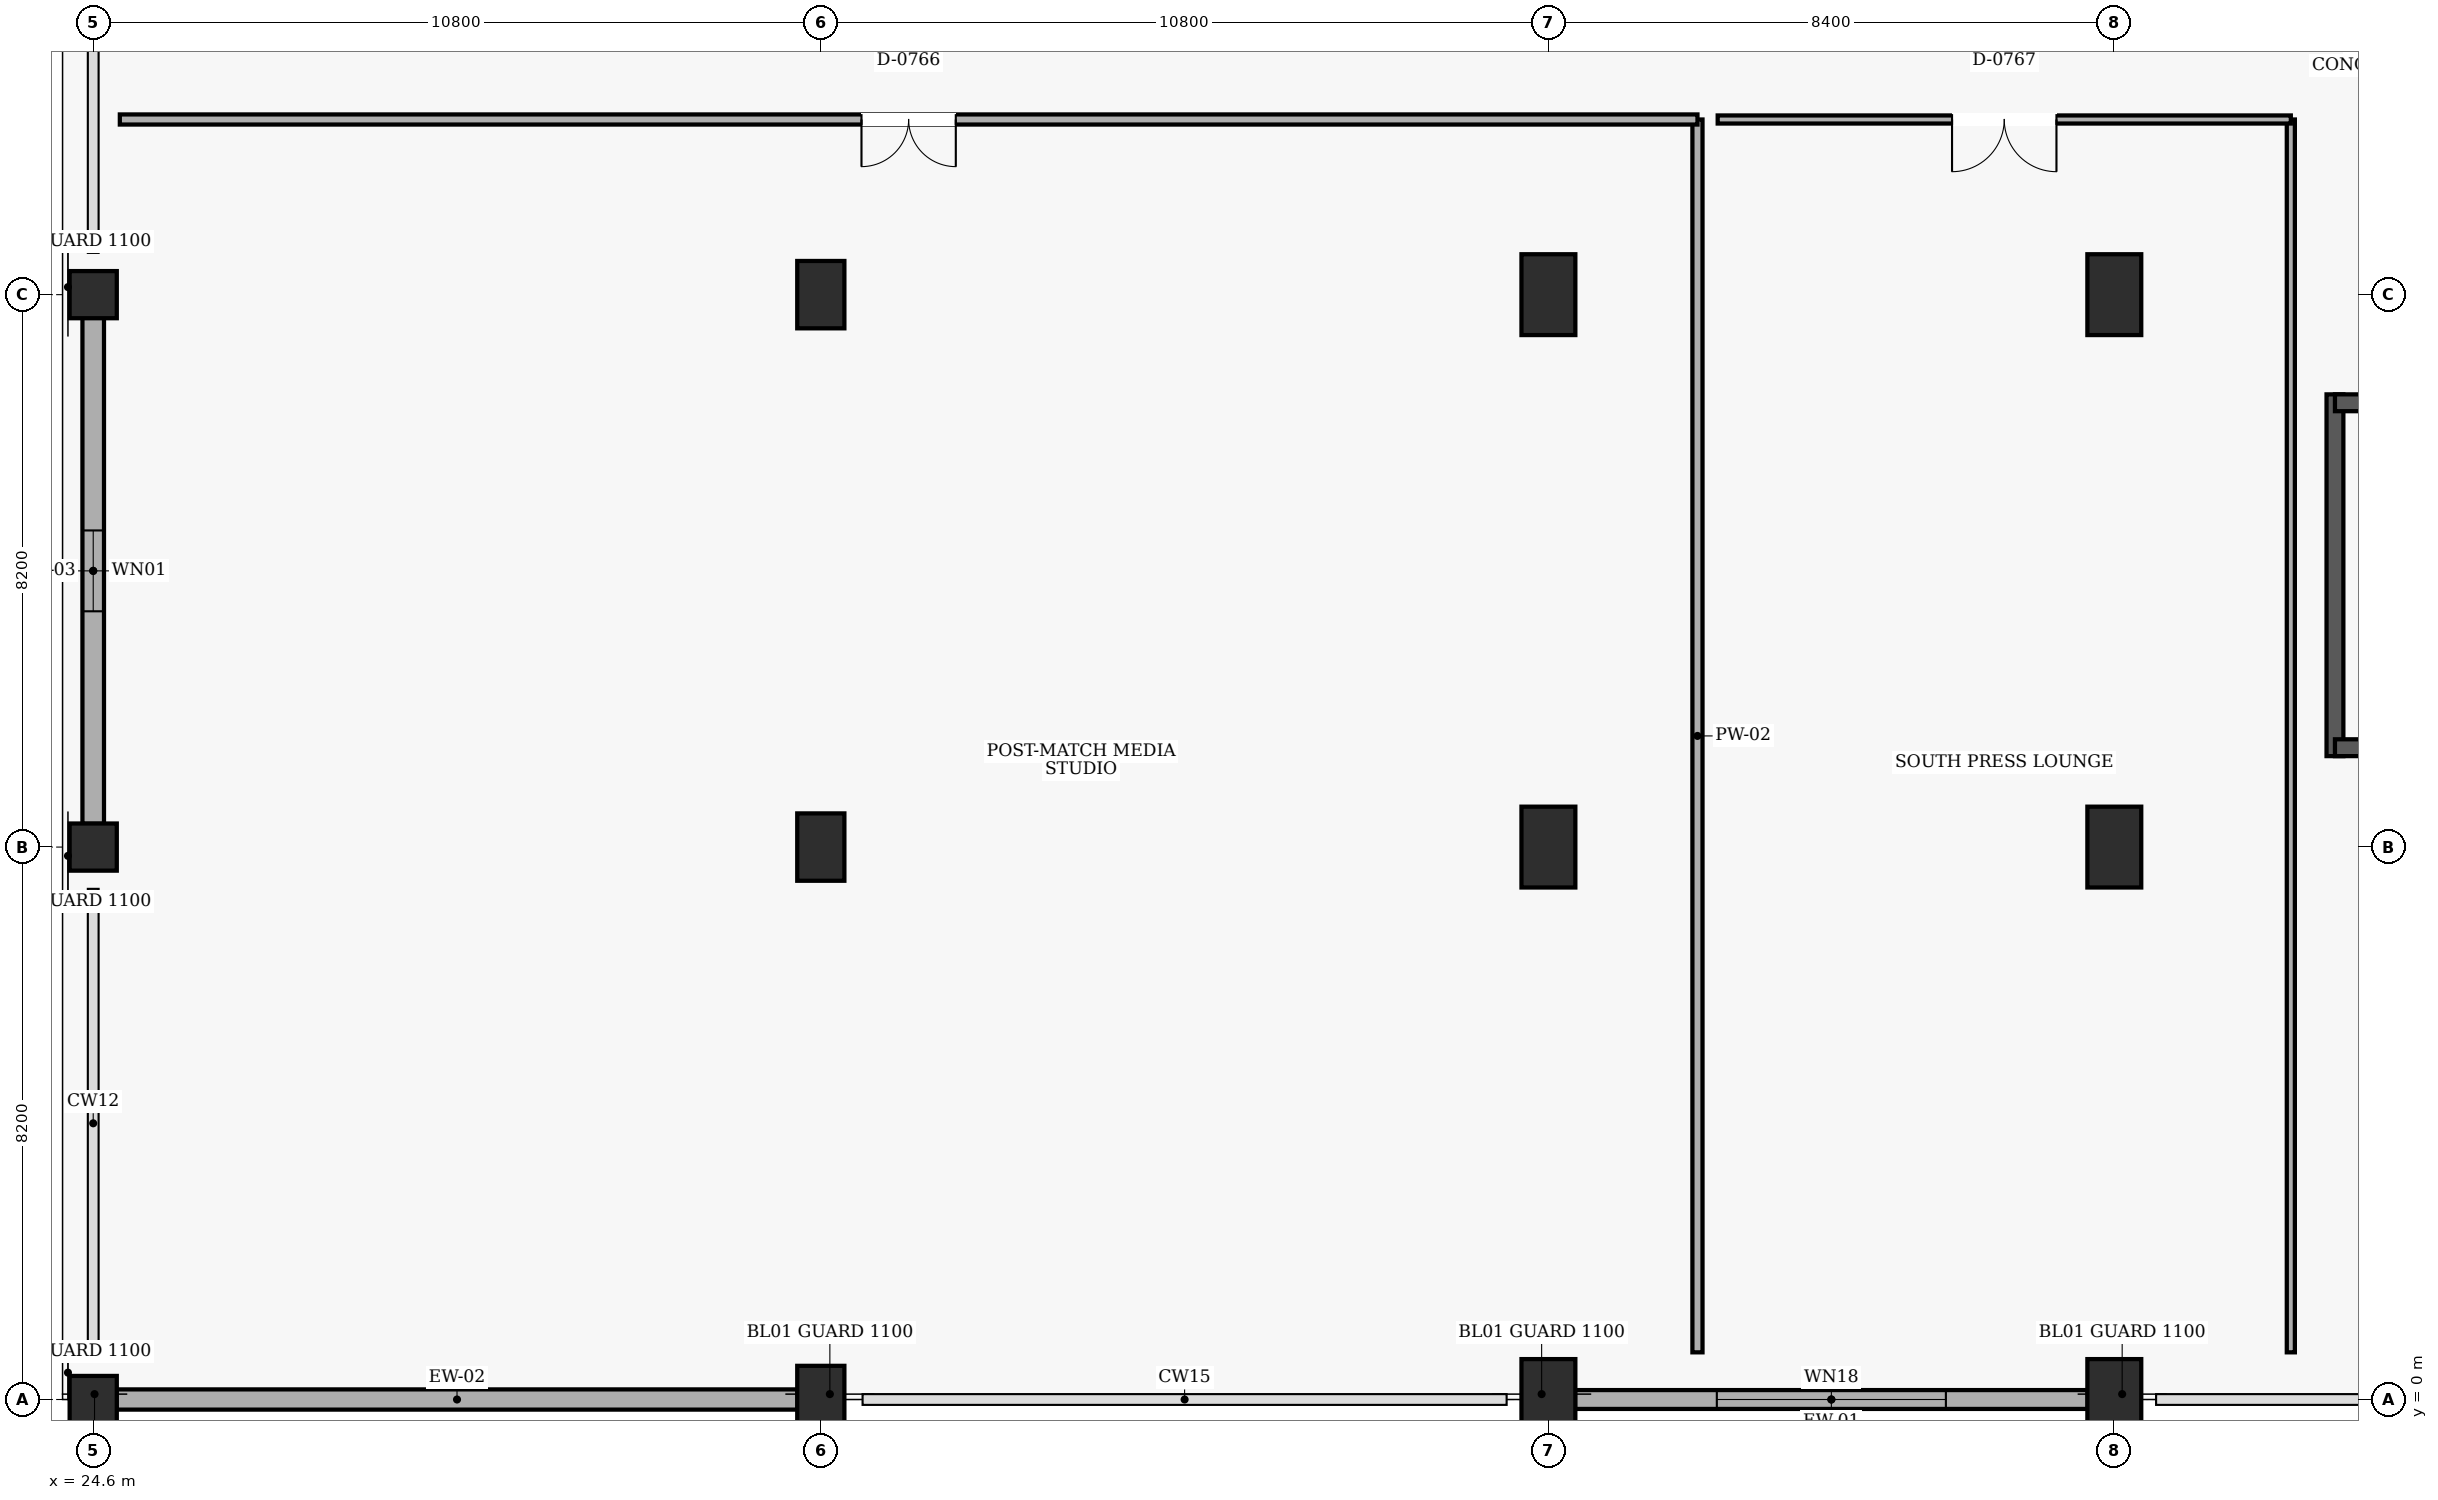
"""IFC4 building model, lengths in metres.
Left out: names, types, materials, properties, quantities, classifications, styles, units other than length and angle.
Written with IfcOpenShell. Run it as: python <this file> out.ifc"""

import sys

from ifc_helpers import new_model, si_unit, direction, frame, frame_2d, origin, origin_2d, place, context, subcontext, project, spatial, rectangle, extrude, element, fill, save


model = new_model("IFC4")
c1 = context("Model", 3, precision=1e-05, world=origin(), true_north=direction((0.0, 1.0)))
c2 = subcontext(c1, "Body", "Model", "MODEL_VIEW")
j1 = project(units=[si_unit("LENGTHUNIT", "METRE"), si_unit("PLANEANGLEUNIT", "RADIAN")], contexts=[c1])
p1 = place(None, origin())
s1 = spatial("IfcSite", under=j1, at=p1, CompositionType="ELEMENT")
p2 = place(p1, origin())
s2 = spatial("IfcBuilding", under=s1, at=p2, CompositionType="ELEMENT")
p3 = place(p2, frame((0.0, 0.0, 19.8)))
s3 = spatial("IfcBuildingStorey", under=s2, at=p3, CompositionType="ELEMENT", Elevation=19.8)
for number, where, z_axis, x_axis in (
    (1, (24.6, 0.0, 0.0), (0.0, 0.0, 1.0), (1.0, 0.0, 0.0)),
    (2, (24.6, 8.2, 0.0), (0.0, 0.0, 1.0), (1.0, 0.0, 0.0)),
    (3, (24.6, 16.4, 0.0), (0.0, 0.0, 1.0), (1.0, 0.0, 0.0)),
):
    element("IfcColumn", number, at=place(p3, frame(where, z_axis=z_axis, x_axis=x_axis)), inside=s3, PredefinedType="COLUMN", context=c2, shape_type="SweptSolid", body=[
        extrude(rectangle(XDim=0.7, YDim=0.7, at=origin_2d()), origin(), (0.0, 0.0, 1.0), 4.8),
    ])
for number, where, z_axis, x_axis in (
    (4, (35.4, 0.0, 0.0), (0.0, 0.0, 1.0), (1.0, 0.0, 0.0)),
    (5, (35.4, 8.2, 0.0), (0.0, 0.0, 1.0), (1.0, 0.0, 0.0)),
    (6, (35.4, 16.4, 0.0), (0.0, 0.0, 1.0), (1.0, 0.0, 0.0)),
):
    element("IfcColumn", number, at=place(p3, frame(where, z_axis=z_axis, x_axis=x_axis)), inside=s3, PredefinedType="COLUMN", context=c2, shape_type="SweptSolid", body=[
        extrude(rectangle(XDim=0.7, YDim=1.0, at=origin_2d()), origin(), (0.0, 0.0, 1.0), 4.8),
    ])
for number, where, z_axis, x_axis in (
    (7, (46.2, 0.0, 0.0), (0.0, 0.0, 1.0), (1.0, 0.0, 0.0)),
    (8, (46.2, 8.2, 0.0), (0.0, 0.0, 1.0), (1.0, 0.0, 0.0)),
    (9, (46.2, 16.4, 0.0), (0.0, 0.0, 1.0), (1.0, 0.0, 0.0)),
    (10, (54.6, 0.0, 0.0), (0.0, 0.0, 1.0), (1.0, 0.0, 0.0)),
    (11, (54.6, 8.2, 0.0), (0.0, 0.0, 1.0), (1.0, 0.0, 0.0)),
    (12, (54.6, 16.4, 0.0), (0.0, 0.0, 1.0), (1.0, 0.0, 0.0)),
):
    element("IfcColumn", number, at=place(p3, frame(where, z_axis=z_axis, x_axis=x_axis)), inside=s3, PredefinedType="COLUMN", context=c2, shape_type="SweptSolid", body=[
        extrude(rectangle(XDim=0.8, YDim=1.2, at=origin_2d()), origin(), (0.0, 0.0, 1.0), 4.8),
    ])
p4 = place(p3, frame((24.6, 8.545, 0.0), z_axis=(0.0, 0.0, 1.0), x_axis=(0.0, 1.0, 0.0)))
e13 = element("IfcWall", 13, at=p4, inside=s3, PredefinedType="SOLIDWALL", context=c2, shape_type="SweptSolid", body=[
    extrude(rectangle(XDim=7.51, YDim=0.32, at=frame_2d((3.755, 0.0))), origin(), (0.0, 0.0, 1.0), 3.82),
])
p5 = place(p4, frame((3.155, 0.0, 0.9)))
e14 = element("IfcOpeningElement", 14, at=p5, cuts=e13, PredefinedType="OPENING", context=c2, shape_type="SweptSolid", body=[
    extrude(rectangle(XDim=1.2, YDim=1.5, at=frame_2d((0.6, 0.75))), frame((0.0, 0.17, 0.0), z_axis=(0.0, -1.0, 0.0), x_axis=(1.0, 0.0, 0.0)), (0.0, 0.0, 1.0), 0.34),
])
p6 = place(p3, frame((54.205, 0.0, 0.0), z_axis=(0.0, 0.0, 1.0), x_axis=(-1.0, 0.0, 0.0)))
e15 = element("IfcWall", 15, at=p6, inside=s3, PredefinedType="SOLIDWALL", context=c2, shape_type="SweptSolid", body=[
    extrude(rectangle(XDim=7.61, YDim=0.28, at=frame_2d((3.805, 0.0))), origin(), (0.0, 0.0, 1.0), 3.68),
])
p7 = place(p6, frame((2.105, 0.0, 0.9)))
e16 = element("IfcOpeningElement", 16, at=p7, cuts=e15, PredefinedType="OPENING", context=c2, shape_type="SweptSolid", body=[
    extrude(rectangle(XDim=3.4, YDim=2.1, at=frame_2d((1.7, 1.05))), frame((0.0, 0.15, 0.0), z_axis=(0.0, -1.0, 0.0), x_axis=(1.0, 0.0, 0.0)), (0.0, 0.0, 1.0), 0.3),
])
p8 = place(p3, frame((35.055, 0.0, 0.0), z_axis=(0.0, 0.0, 1.0), x_axis=(-1.0, 0.0, 0.0)))
e17 = element("IfcWall", 17, at=p8, inside=s3, PredefinedType="SOLIDWALL", context=c2, shape_type="SweptSolid", body=[
    extrude(rectangle(XDim=10.11, YDim=0.3, at=frame_2d((5.055, 0.0))), origin(), (0.0, 0.0, 1.0), 3.52),
])
p9 = place(p3, frame((57.875, 14.92, 0.0), z_axis=(0.0, 0.0, 1.0), x_axis=(0.0, -1.0, 0.0)))
e18 = element("IfcWall", 18, at=p9, inside=s3, PredefinedType="SHEAR", context=c2, shape_type="SweptSolid", body=[
    extrude(rectangle(XDim=5.37, YDim=0.25, at=frame_2d((2.685, 0.0))), origin(), (0.0, 0.0, 1.0), 4.5),
])
p10 = place(p3, frame((57.875, 14.795, 0.0), z_axis=(0.0, 0.0, 1.0), x_axis=(1.0, 0.0, 0.0)))
e19 = element("IfcWall", 19, at=p10, inside=s3, PredefinedType="SHEAR", context=c2, shape_type="SweptSolid", body=[
    extrude(rectangle(XDim=10.85, YDim=0.25, at=frame_2d((5.425, 0.0))), origin(), (0.0, 0.0, 1.0), 4.5),
])
p11 = place(p10, frame((0.52, 0.0, 0.0)))
e20 = element("IfcOpeningElement", 20, at=p11, cuts=e19, PredefinedType="OPENING", context=c2, shape_type="SweptSolid", body=[
    extrude(rectangle(XDim=1.4, YDim=2.15, at=frame_2d((0.7, 1.075))), frame((0.0, 0.135, 0.0), z_axis=(0.0, -1.0, 0.0), x_axis=(1.0, 0.0, 0.0)), (0.0, 0.0, 1.0), 0.27),
])
p12 = place(p3, frame((57.875, 9.675, 0.0), z_axis=(0.0, 0.0, 1.0), x_axis=(1.0, 0.0, 0.0)))
e21 = element("IfcWall", 21, at=p12, inside=s3, PredefinedType="SHEAR", context=c2, shape_type="SweptSolid", body=[
    extrude(rectangle(XDim=10.85, YDim=0.25, at=frame_2d((5.425, 0.0))), origin(), (0.0, 0.0, 1.0), 4.5),
])
p13 = place(p3, frame((48.413, 0.7, 0.0), z_axis=(0.0, 0.0, 1.0), x_axis=(0.0, 1.0, 0.0)))
e22 = element("IfcWall", 22, at=p13, inside=s3, PredefinedType="PARTITIONING", context=c2, shape_type="SweptSolid", body=[
    extrude(rectangle(XDim=18.3, YDim=0.15, at=frame_2d((9.15, 0.0))), origin(), (0.0, 0.0, 1.0), 4.5),
])
p14 = place(p3, frame((48.413, 19.0, 0.0), z_axis=(0.0, 0.0, 1.0), x_axis=(-1.0, 0.0, 0.0)))
e23 = element("IfcWall", 23, at=p14, inside=s3, PredefinedType="PARTITIONING", context=c2, shape_type="SweptSolid", body=[
    extrude(rectangle(XDim=23.417, YDim=0.15, at=frame_2d((11.709, 0.0))), origin(), (0.0, 0.0, 1.0), 4.5),
])
p15 = place(p14, frame((11.009, 0.0, 0.0)))
e24 = element("IfcOpeningElement", 24, at=p15, cuts=e23, PredefinedType="OPENING", context=c2, shape_type="SweptSolid", body=[
    extrude(rectangle(XDim=1.4, YDim=2.2, at=frame_2d((0.7, 1.1))), frame((0.0, 0.085, 0.0), z_axis=(0.0, -1.0, 0.0), x_axis=(1.0, 0.0, 0.0)), (0.0, 0.0, 1.0), 0.17),
])
p16 = place(p3, frame((57.22, 0.7, 0.0), z_axis=(0.0, 0.0, 1.0), x_axis=(0.0, 1.0, 0.0)))
e25 = element("IfcWall", 25, at=p16, inside=s3, PredefinedType="PARTITIONING", context=c2, shape_type="SweptSolid", body=[
    extrude(rectangle(XDim=18.3, YDim=0.12, at=frame_2d((9.15, 0.0))), origin(), (0.0, 0.0, 1.0), 4.5),
])
p17 = place(p3, frame((57.22, 19.0, 0.0), z_axis=(0.0, 0.0, 1.0), x_axis=(-1.0, 0.0, 0.0)))
e26 = element("IfcWall", 26, at=p17, inside=s3, PredefinedType="PARTITIONING", context=c2, shape_type="SweptSolid", body=[
    extrude(rectangle(XDim=8.508, YDim=0.12, at=frame_2d((4.254, 0.0))), origin(), (0.0, 0.0, 1.0), 4.5),
])
p18 = place(p17, frame((3.479, 0.0, 0.0)))
e27 = element("IfcOpeningElement", 27, at=p18, cuts=e26, PredefinedType="OPENING", context=c2, shape_type="SweptSolid", body=[
    extrude(rectangle(XDim=1.55, YDim=2.2, at=frame_2d((0.775, 1.1))), frame((0.0, 0.07, 0.0), z_axis=(0.0, -1.0, 0.0), x_axis=(1.0, 0.0, 0.0)), (0.0, 0.0, 1.0), 0.14),
])
p19 = place(p5, origin())
e28 = element("IfcWindow", 28, at=p19, inside=s3, PartitioningType="SINGLE_PANEL", PredefinedType="WINDOW", context=c2, shape_type="SweptSolid", body=[
    extrude(rectangle(XDim=1.2, YDim=1.5, at=frame_2d((0.6, 0.75))), frame((0.0, 0.03, 0.0), z_axis=(0.0, -1.0, 0.0), x_axis=(1.0, 0.0, 0.0)), (0.0, 0.0, 1.0), 0.06),
])
fill(e14, e28)
p20 = place(p7, origin())
e29 = element("IfcWindow", 29, at=p20, inside=s3, PartitioningType="SINGLE_PANEL", PredefinedType="WINDOW", context=c2, shape_type="SweptSolid", body=[
    extrude(rectangle(XDim=3.4, YDim=2.1, at=frame_2d((1.7, 1.05))), frame((0.0, 0.03, 0.0), z_axis=(0.0, -1.0, 0.0), x_axis=(1.0, 0.0, 0.0)), (0.0, 0.0, 1.0), 0.06),
])
fill(e16, e29)
p21 = place(p15, origin())
e30 = element("IfcDoor", 30, at=p21, inside=s3, OperationType="DOUBLE_DOOR_SINGLE_SWING", PredefinedType="DOOR", context=c2, shape_type="SweptSolid", body=[
    extrude(rectangle(XDim=1.4, YDim=2.2, at=frame_2d((0.7, 1.1))), frame((0.0, 0.025, 0.0), z_axis=(0.0, -1.0, 0.0), x_axis=(1.0, 0.0, 0.0)), (0.0, 0.0, 1.0), 0.05),
])
fill(e24, e30)
p22 = place(p18, origin())
e31 = element("IfcDoor", 31, at=p22, inside=s3, OperationType="DOUBLE_DOOR_SINGLE_SWING", PredefinedType="DOOR", context=c2, shape_type="SweptSolid", body=[
    extrude(rectangle(XDim=1.55, YDim=2.2, at=frame_2d((0.775, 1.1))), frame((0.0, 0.025, 0.0), z_axis=(0.0, -1.0, 0.0), x_axis=(1.0, 0.0, 0.0)), (0.0, 0.0, 1.0), 0.05),
])
fill(e27, e31)
save(model, sys.argv[1])
